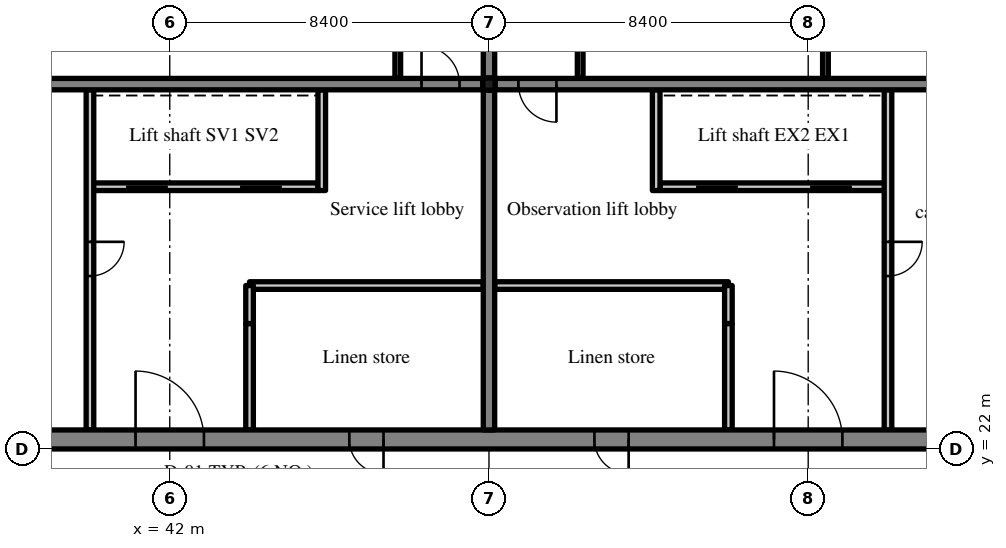
"""IFC4 building model, lengths in metres.
Left out: names, types, materials, properties, quantities, classifications, styles, units other than length and angle.
Written with IfcOpenShell. Run it as: python <this file> out.ifc"""

import sys

from ifc_helpers import new_model, si_unit, direction, frame, frame_2d, origin, origin_2d, place, context, subcontext, project, spatial, rectangle, hollow_circle, extrude, source, transform, mapped, element, fill, save


model = new_model("IFC4")
c1 = context("Model", 3, precision=1e-05, world=origin(), true_north=direction((0.0, 1.0)))
c2 = subcontext(c1, "Body", "Model", "MODEL_VIEW")
j1 = project(units=[si_unit("LENGTHUNIT", "METRE"), si_unit("PLANEANGLEUNIT", "RADIAN")], contexts=[c1])
p1 = place(None, origin())
s1 = spatial("IfcSite", under=j1, at=p1, CompositionType="ELEMENT")
p2 = place(p1, origin())
s2 = spatial("IfcBuilding", under=s1, at=p2, CompositionType="ELEMENT")
p3 = place(p2, frame((0.0, 0.0, 329.7)))
s3 = spatial("IfcBuildingStorey", under=s2, at=p3, CompositionType="ELEMENT", Elevation=329.7)
m1 = source(origin(), c2, "Body", "SweptSolid", [
    extrude(rectangle(XDim=50.4, YDim=0.5, at=frame_2d((25.2, 0.0))), origin(), (0.0, 0.0, 1.0), 4.72),
])
p4 = place(p3, frame((25.2, 22.25, 0.0), z_axis=(0.0, 0.0, 1.0), x_axis=(1.0, 0.0, 0.0)))
e1 = element("IfcWall", 1, at=p4, inside=s3, PredefinedType="SHEAR", context=c2, shape_type="MappedRepresentation", body=[
    mapped(m1, transform((0.0, 0.0, 0.0), scale=1.0)),
])
m2 = source(origin(), c2, "Body", "SweptSolid", [
    extrude(rectangle(XDim=1.8, YDim=2.1, at=frame_2d((0.9, 1.05))), frame((0.0, 0.26, 0.0), z_axis=(0.0, -1.0, 0.0), x_axis=(1.0, 0.0, 0.0)), (0.0, 0.0, 1.0), 0.52),
])
p5 = place(p4, frame((15.9, 0.0, 0.0)))
e2 = element("IfcOpeningElement", 2, at=p5, cuts=e1, PredefinedType="OPENING", context=c2, shape_type="MappedRepresentation", body=[
    mapped(m2, transform((0.0, 0.0, 0.0), scale=1.0)),
])
m3 = source(origin(), c2, "Body", "SweptSolid", [
    extrude(rectangle(XDim=0.9, YDim=2.1, at=frame_2d((0.45, 1.05))), frame((0.0, 0.26, 0.0), z_axis=(0.0, -1.0, 0.0), x_axis=(1.0, 0.0, 0.0)), (0.0, 0.0, 1.0), 0.52),
])
p6 = place(p4, frame((21.525, 0.0, 0.0)))
e3 = element("IfcOpeningElement", 3, at=p6, cuts=e1, PredefinedType="OPENING", context=c2, shape_type="MappedRepresentation", body=[
    mapped(m3, transform((0.0, 0.0, 0.0), scale=1.0)),
])
p7 = place(p4, frame((32.7, 0.0, 0.0)))
e4 = element("IfcOpeningElement", 4, at=p7, cuts=e1, PredefinedType="OPENING", context=c2, shape_type="MappedRepresentation", body=[
    mapped(m2, transform((0.0, 0.0, 0.0), scale=1.0)),
])
p8 = place(p4, frame((39.825, 0.0, 0.0)))
e5 = element("IfcOpeningElement", 5, at=p8, cuts=e1, PredefinedType="OPENING", context=c2, shape_type="MappedRepresentation", body=[
    mapped(m3, transform((0.0, 0.0, 0.0), scale=1.0)),
])
p9 = place(p4, frame((27.975, 0.0, 0.0)))
e6 = element("IfcOpeningElement", 6, at=p9, cuts=e1, PredefinedType="OPENING", context=c2, shape_type="MappedRepresentation", body=[
    mapped(m3, transform((0.0, 0.0, 0.0), scale=1.0)),
])
m4 = source(origin(), c2, "Body", "SweptSolid", [
    extrude(rectangle(XDim=1.2, YDim=2.1, at=frame_2d((0.6, 1.05))), frame((0.0, 0.26, 0.0), z_axis=(0.0, -1.0, 0.0), x_axis=(1.0, 0.0, 0.0)), (0.0, 0.0, 1.0), 0.52),
])
p10 = place(p4, frame((6.5, 0.0, 0.0)))
e7 = element("IfcOpeningElement", 7, at=p10, cuts=e1, PredefinedType="OPENING", context=c2, shape_type="MappedRepresentation", body=[
    mapped(m4, transform((0.0, 0.0, 0.0), scale=1.0)),
])
p11 = place(p4, frame((47.975, 0.0, 0.0)))
e8 = element("IfcOpeningElement", 8, at=p11, cuts=e1, PredefinedType="OPENING", context=c2, shape_type="MappedRepresentation", body=[
    mapped(m4, transform((0.0, 0.0, 0.0), scale=1.0)),
])
m5 = source(origin(), c2, "Body", "SweptSolid", [
    extrude(rectangle(XDim=19.0, YDim=0.3, at=frame_2d((9.5, 0.0))), origin(), (0.0, 0.0, 1.0), 4.72),
])
p12 = place(p3, frame((50.4, 22.5, 0.0), z_axis=(0.0, 0.0, 1.0), x_axis=(0.0, 1.0, 0.0)))
e9 = element("IfcWall", 9, at=p12, inside=s3, PredefinedType="SHEAR", context=c2, shape_type="MappedRepresentation", body=[
    mapped(m5, transform((0.0, 0.0, 0.0), scale=1.0)),
])
m6 = source(origin(), c2, "Body", "SweptSolid", [
    extrude(rectangle(XDim=1.1, YDim=2.1, at=frame_2d((0.55, 1.05))), frame((0.0, 0.16, 0.0), z_axis=(0.0, -1.0, 0.0), x_axis=(1.0, 0.0, 0.0)), (0.0, 0.0, 1.0), 0.32),
])
p13 = place(p12, frame((12.95, 0.0, 0.0)))
e10 = element("IfcOpeningElement", 10, at=p13, cuts=e9, PredefinedType="OPENING", context=c2, shape_type="MappedRepresentation", body=[
    mapped(m6, transform((0.0, 0.0, 0.0), scale=1.0)),
])
m7 = source(origin(), c2, "Body", "SweptSolid", [
    extrude(rectangle(XDim=16.5, YDim=0.3, at=frame_2d((8.25, 0.0))), origin(), (0.0, 0.0, 1.0), 4.72),
])
p14 = place(p3, frame((33.75, 31.6, 0.0), z_axis=(0.0, 0.0, 1.0), x_axis=(1.0, 0.0, 0.0)))
e11 = element("IfcWall", 11, at=p14, inside=s3, PredefinedType="SHEAR", context=c2, shape_type="MappedRepresentation", body=[
    mapped(m7, transform((0.0, 0.0, 0.0), scale=1.0)),
])
m8 = source(origin(), c2, "Body", "SweptSolid", [
    extrude(rectangle(XDim=1.0, YDim=2.1, at=frame_2d((0.5, 1.05))), frame((0.0, 0.16, 0.0), z_axis=(0.0, -1.0, 0.0), x_axis=(1.0, 0.0, 0.0)), (0.0, 0.0, 1.0), 0.32),
])
p15 = place(p14, frame((14.875, 0.0, 0.0)))
e12 = element("IfcOpeningElement", 12, at=p15, cuts=e11, PredefinedType="OPENING", context=c2, shape_type="MappedRepresentation", body=[
    mapped(m8, transform((0.0, 0.0, 0.0), scale=1.0)),
])
p16 = place(p3, frame((50.55, 31.6, 0.0), z_axis=(0.0, 0.0, 1.0), x_axis=(1.0, 0.0, 0.0)))
e13 = element("IfcWall", 13, at=p16, inside=s3, PredefinedType="SHEAR", context=c2, shape_type="MappedRepresentation", body=[
    mapped(m7, transform((0.0, 0.0, 0.0), scale=1.0)),
])
p17 = place(p16, frame((0.625, 0.0, 0.0)))
e14 = element("IfcOpeningElement", 14, at=p17, cuts=e13, PredefinedType="OPENING", context=c2, shape_type="MappedRepresentation", body=[
    mapped(m8, transform((0.0, 0.0, 0.0), scale=1.0)),
])
m9 = source(origin(), c2, "Body", "SweptSolid", [
    extrude(hollow_circle(Radius=0.162, WallThickness=0.012, at=origin_2d()), origin(), (0.0, 0.0, 1.0), 4.4),
])
p18 = place(p3, frame((50.4, 31.6, 5.0), z_axis=(0.0, 0.0, 1.0), x_axis=(1.0, 0.0, 0.0)))
e15 = element("IfcColumn", 15, at=p18, inside=s3, PredefinedType="COLUMN", context=c2, shape_type="MappedRepresentation", body=[
    mapped(m9, transform((0.0, 0.0, 0.0), scale=1.0)),
])
m10 = source(origin(), c2, "Body", "SweptSolid", [
    extrude(rectangle(XDim=6.0, YDim=0.2, at=frame_2d((3.0, 0.0))), origin(), (0.0, 0.0, 1.0), 4.72),
])
p19 = place(p3, frame((39.9, 28.9, 0.0), z_axis=(0.0, 0.0, 1.0), x_axis=(1.0, 0.0, 0.0)))
e16 = element("IfcWall", 16, at=p19, inside=s3, PredefinedType="SOLIDWALL", context=c2, shape_type="MappedRepresentation", body=[
    mapped(m10, transform((0.0, 0.0, 0.0), scale=1.0)),
])
m11 = source(origin(), c2, "Body", "SweptSolid", [
    extrude(rectangle(XDim=1.1, YDim=2.1, at=frame_2d((0.55, 1.05))), frame((0.0, 0.11, 0.0), z_axis=(0.0, -1.0, 0.0), x_axis=(1.0, 0.0, 0.0)), (0.0, 0.0, 1.0), 0.22),
])
p20 = place(p19, frame((0.95, 0.0, 0.0)))
e17 = element("IfcOpeningElement", 17, at=p20, cuts=e16, PredefinedType="OPENING", context=c2, shape_type="MappedRepresentation", body=[
    mapped(m11, transform((0.0, 0.0, 0.0), scale=1.0)),
])
p21 = place(p19, frame((3.95, 0.0, 0.0)))
e18 = element("IfcOpeningElement", 18, at=p21, cuts=e16, PredefinedType="OPENING", context=c2, shape_type="MappedRepresentation", body=[
    mapped(m11, transform((0.0, 0.0, 0.0), scale=1.0)),
])
m12 = source(origin(), c2, "Body", "SweptSolid", [
    extrude(rectangle(XDim=8.95, YDim=0.2, at=frame_2d((4.475, 0.0))), origin(), (0.0, 0.0, 1.0), 4.72),
])
p22 = place(p3, frame((39.9, 22.5, 0.0), z_axis=(0.0, 0.0, 1.0), x_axis=(0.0, 1.0, 0.0)))
e19 = element("IfcWall", 19, at=p22, inside=s3, PredefinedType="PARTITIONING", context=c2, shape_type="MappedRepresentation", body=[
    mapped(m12, transform((0.0, 0.0, 0.0), scale=1.0)),
])
m13 = source(origin(), c2, "Body", "SweptSolid", [
    extrude(rectangle(XDim=0.9, YDim=2.1, at=frame_2d((0.45, 1.05))), frame((0.0, 0.11, 0.0), z_axis=(0.0, -1.0, 0.0), x_axis=(1.0, 0.0, 0.0)), (0.0, 0.0, 1.0), 0.22),
])
p23 = place(p22, frame((4.05, 0.0, 0.0)))
e20 = element("IfcOpeningElement", 20, at=p23, cuts=e19, PredefinedType="OPENING", context=c2, shape_type="MappedRepresentation", body=[
    mapped(m13, transform((0.0, 0.0, 0.0), scale=1.0)),
])
m14 = source(origin(), c2, "Body", "SweptSolid", [
    extrude(rectangle(XDim=2.8, YDim=0.2, at=frame_2d((1.4, 0.0))), origin(), (0.0, 0.0, 1.0), 4.72),
])
p24 = place(p3, frame((44.1, 22.5, 0.0), z_axis=(0.0, 0.0, 1.0), x_axis=(0.0, 1.0, 0.0)))
e21 = element("IfcWall", 21, at=p24, inside=s3, PredefinedType="PARTITIONING", context=c2, shape_type="MappedRepresentation", body=[
    mapped(m14, transform((0.0, 0.0, 0.0), scale=1.0)),
])
m15 = source(origin(), c2, "Body", "SweptSolid", [
    extrude(rectangle(XDim=2.65, YDim=0.2, at=frame_2d((1.325, 0.0))), origin(), (0.0, 0.0, 1.0), 4.72),
])
p25 = place(p3, frame((46.0, 28.8, 0.0), z_axis=(0.0, 0.0, 1.0), x_axis=(0.0, 1.0, 0.0)))
e22 = element("IfcWall", 22, at=p25, inside=s3, PredefinedType="SOLIDWALL", context=c2, shape_type="MappedRepresentation", body=[
    mapped(m15, transform((0.0, 0.0, 0.0), scale=1.0)),
])
m16 = source(origin(), c2, "Body", "SweptSolid", [
    extrude(rectangle(XDim=6.15, YDim=0.2, at=frame_2d((3.075, 0.0))), origin(), (0.0, 0.0, 1.0), 4.72),
])
p26 = place(p3, frame((44.1, 26.3, 0.0), z_axis=(0.0, 0.0, 1.0), x_axis=(1.0, 0.0, 0.0)))
e23 = element("IfcWall", 23, at=p26, inside=s3, PredefinedType="PARTITIONING", context=c2, shape_type="MappedRepresentation", body=[
    mapped(m16, transform((0.0, 0.0, 0.0), scale=1.0)),
])
m17 = source(origin(), c2, "Body", "SweptSolid", [
    extrude(rectangle(XDim=1.0, YDim=0.2, at=frame_2d((0.5, 0.0))), origin(), (0.0, 0.0, 1.0), 4.72),
])
p27 = place(p3, frame((44.1, 25.3, 0.0), z_axis=(0.0, 0.0, 1.0), x_axis=(0.0, 1.0, 0.0)))
e24 = element("IfcWall", 24, at=p27, inside=s3, PredefinedType="PARTITIONING", context=c2, shape_type="MappedRepresentation", body=[
    mapped(m17, transform((0.0, 0.0, 0.0), scale=1.0)),
])
m18 = source(origin(), c2, "Body", "SweptSolid", [
    extrude(rectangle(XDim=3.25, YDim=0.15, at=frame_2d((1.625, 0.0))), origin(), (0.0, 0.0, 1.0), 4.72),
])
p28 = place(p3, frame((48.0, 31.75, 0.0), z_axis=(0.0, 0.0, 1.0), x_axis=(0.0, 1.0, 0.0)))
e25 = element("IfcWall", 25, at=p28, inside=s3, PredefinedType="PARTITIONING", context=c2, shape_type="MappedRepresentation", body=[
    mapped(m18, transform((0.0, 0.0, 0.0), scale=1.0)),
])
p29 = place(p3, frame((60.9, 28.9, 0.0), z_axis=(0.0, 0.0, 1.0), x_axis=(-1.0, 0.0, 0.0)))
e26 = element("IfcWall", 26, at=p29, inside=s3, PredefinedType="SOLIDWALL", context=c2, shape_type="MappedRepresentation", body=[
    mapped(m10, transform((0.0, 0.0, 0.0), scale=1.0)),
])
p30 = place(p29, frame((0.95, 0.0, 0.0)))
e27 = element("IfcOpeningElement", 27, at=p30, cuts=e26, PredefinedType="OPENING", context=c2, shape_type="MappedRepresentation", body=[
    mapped(m11, transform((0.0, 0.0, 0.0), scale=1.0)),
])
p31 = place(p29, frame((3.95, 0.0, 0.0)))
e28 = element("IfcOpeningElement", 28, at=p31, cuts=e26, PredefinedType="OPENING", context=c2, shape_type="MappedRepresentation", body=[
    mapped(m11, transform((0.0, 0.0, 0.0), scale=1.0)),
])
p32 = place(p3, frame((60.9, 22.5, 0.0), z_axis=(0.0, 0.0, 1.0), x_axis=(0.0, 1.0, 0.0)))
e29 = element("IfcWall", 29, at=p32, inside=s3, PredefinedType="PARTITIONING", context=c2, shape_type="MappedRepresentation", body=[
    mapped(m12, transform((0.0, 0.0, 0.0), scale=1.0)),
])
p33 = place(p32, frame((4.05, 0.0, 0.0)))
e30 = element("IfcOpeningElement", 30, at=p33, cuts=e29, PredefinedType="OPENING", context=c2, shape_type="MappedRepresentation", body=[
    mapped(m13, transform((0.0, 0.0, 0.0), scale=1.0)),
])
p34 = place(p3, frame((56.7, 22.5, 0.0), z_axis=(0.0, 0.0, 1.0), x_axis=(0.0, 1.0, 0.0)))
e31 = element("IfcWall", 31, at=p34, inside=s3, PredefinedType="PARTITIONING", context=c2, shape_type="MappedRepresentation", body=[
    mapped(m14, transform((0.0, 0.0, 0.0), scale=1.0)),
])
p35 = place(p3, frame((54.8, 28.8, 0.0), z_axis=(0.0, 0.0, 1.0), x_axis=(0.0, 1.0, 0.0)))
e32 = element("IfcWall", 32, at=p35, inside=s3, PredefinedType="SOLIDWALL", context=c2, shape_type="MappedRepresentation", body=[
    mapped(m15, transform((0.0, 0.0, 0.0), scale=1.0)),
])
p36 = place(p3, frame((56.7, 26.3, 0.0), z_axis=(0.0, 0.0, 1.0), x_axis=(-1.0, 0.0, 0.0)))
e33 = element("IfcWall", 33, at=p36, inside=s3, PredefinedType="PARTITIONING", context=c2, shape_type="MappedRepresentation", body=[
    mapped(m16, transform((0.0, 0.0, 0.0), scale=1.0)),
])
p37 = place(p3, frame((56.7, 25.3, 0.0), z_axis=(0.0, 0.0, 1.0), x_axis=(0.0, 1.0, 0.0)))
e34 = element("IfcWall", 34, at=p37, inside=s3, PredefinedType="PARTITIONING", context=c2, shape_type="MappedRepresentation", body=[
    mapped(m17, transform((0.0, 0.0, 0.0), scale=1.0)),
])
for number, where, z_axis, x_axis in (
    (35, (52.8, 31.75, 0.0), (0.0, 0.0, 1.0), (0.0, 1.0, 0.0)),
    (36, (59.254, 31.75, 0.0), (0.0, 0.0, 1.0), (0.0, 1.0, 0.0)),
):
    element("IfcWall", number, at=place(p3, frame(where, z_axis=z_axis, x_axis=x_axis)), inside=s3, PredefinedType="PARTITIONING", context=c2, shape_type="MappedRepresentation", body=[
        mapped(m18, transform((0.0, 0.0, 0.0), scale=1.0)),
    ])
m19 = source(origin(), c2, "Body", "SweptSolid", [
    extrude(rectangle(XDim=1.8, YDim=2.1, at=frame_2d((0.9, 1.05))), frame((0.0, 0.175, 0.0), z_axis=(0.0, -1.0, 0.0), x_axis=(1.0, 0.0, 0.0)), (0.0, 0.0, 1.0), 0.05),
])
p38 = place(p5, origin())
e37 = element("IfcDoor", 37, at=p38, inside=s3, OperationType="DOUBLE_DOOR_SINGLE_SWING", PredefinedType="DOOR", context=c2, shape_type="MappedRepresentation", body=[
    mapped(m19, transform((0.0, 0.0, 0.0), scale=1.0)),
])
fill(e2, e37)
m20 = source(origin(), c2, "Body", "SweptSolid", [
    extrude(rectangle(XDim=1.0, YDim=2.1, at=frame_2d((0.5, 1.05))), frame((0.0, 0.025, 0.0), z_axis=(0.0, -1.0, 0.0), x_axis=(1.0, 0.0, 0.0)), (0.0, 0.0, 1.0), 0.05),
])
p39 = place(p15, origin())
e38 = element("IfcDoor", 38, at=p39, inside=s3, OperationType="SINGLE_SWING_LEFT", PredefinedType="DOOR", context=c2, shape_type="MappedRepresentation", body=[
    mapped(m20, transform((0.0, 0.0, 0.0), scale=1.0)),
])
fill(e12, e38)
m21 = source(origin(), c2, "Body", "SweptSolid", [
    extrude(rectangle(XDim=1.1, YDim=2.1, at=frame_2d((0.55, 1.05))), frame((0.0, 0.025, 0.0), z_axis=(0.0, -1.0, 0.0), x_axis=(1.0, 0.0, 0.0)), (0.0, 0.0, 1.0), 0.05),
])
p40 = place(p20, origin())
e39 = element("IfcDoor", 39, at=p40, inside=s3, OperationType="SLIDING_TO_LEFT", PredefinedType="DOOR", context=c2, shape_type="MappedRepresentation", body=[
    mapped(m21, transform((0.0, 0.0, 0.0), scale=1.0)),
])
fill(e17, e39)
p41 = place(p21, origin())
e40 = element("IfcDoor", 40, at=p41, inside=s3, OperationType="SLIDING_TO_RIGHT", PredefinedType="DOOR", context=c2, shape_type="MappedRepresentation", body=[
    mapped(m21, transform((0.0, 0.0, 0.0), scale=1.0)),
])
fill(e18, e40)
m22 = source(origin(), c2, "Body", "SweptSolid", [
    extrude(rectangle(XDim=0.9, YDim=2.1, at=frame_2d((0.45, 1.05))), frame((0.0, 0.025, 0.0), z_axis=(0.0, -1.0, 0.0), x_axis=(1.0, 0.0, 0.0)), (0.0, 0.0, 1.0), 0.05),
])
p42 = place(p23, origin())
e41 = element("IfcDoor", 41, at=p42, inside=s3, OperationType="SINGLE_SWING_RIGHT", PredefinedType="DOOR", context=c2, shape_type="MappedRepresentation", body=[
    mapped(m22, transform((0.0, 0.0, 0.0), scale=1.0)),
])
fill(e20, e41)
m23 = source(origin(), c2, "Body", "SweptSolid", [
    extrude(rectangle(XDim=0.9, YDim=2.1, at=frame_2d((0.45, 1.05))), frame((0.0, 0.175, 0.0), z_axis=(0.0, -1.0, 0.0), x_axis=(1.0, 0.0, 0.0)), (0.0, 0.0, 1.0), 0.05),
])
p43 = place(p6, origin())
e42 = element("IfcDoor", 42, at=p43, inside=s3, OperationType="SINGLE_SWING_RIGHT", PredefinedType="DOOR", context=c2, shape_type="MappedRepresentation", body=[
    mapped(m23, transform((0.0, 0.0, 0.0), scale=1.0)),
])
fill(e3, e42)
p44 = place(p7, origin())
e43 = element("IfcDoor", 43, at=p44, inside=s3, OperationType="DOUBLE_DOOR_SINGLE_SWING", PredefinedType="DOOR", context=c2, shape_type="MappedRepresentation", body=[
    mapped(m19, transform((0.0, 0.0, 0.0), scale=1.0)),
])
fill(e4, e43)
p45 = place(p17, origin())
e44 = element("IfcDoor", 44, at=p45, inside=s3, OperationType="SINGLE_SWING_RIGHT", PredefinedType="DOOR", context=c2, shape_type="MappedRepresentation", body=[
    mapped(m20, transform((0.0, 0.0, 0.0), scale=1.0)),
])
fill(e14, e44)
p46 = place(p30, origin())
e45 = element("IfcDoor", 45, at=p46, inside=s3, OperationType="SLIDING_TO_RIGHT", PredefinedType="DOOR", context=c2, shape_type="MappedRepresentation", body=[
    mapped(m21, transform((0.0, 0.0, 0.0), scale=1.0)),
])
fill(e27, e45)
p47 = place(p31, origin())
e46 = element("IfcDoor", 46, at=p47, inside=s3, OperationType="SLIDING_TO_LEFT", PredefinedType="DOOR", context=c2, shape_type="MappedRepresentation", body=[
    mapped(m21, transform((0.0, 0.0, 0.0), scale=1.0)),
])
fill(e28, e46)
p48 = place(p33, origin())
e47 = element("IfcDoor", 47, at=p48, inside=s3, OperationType="SINGLE_SWING_RIGHT", PredefinedType="DOOR", context=c2, shape_type="MappedRepresentation", body=[
    mapped(m22, transform((0.0, 0.0, 0.0), scale=1.0)),
])
fill(e30, e47)
p49 = place(p9, origin())
e48 = element("IfcDoor", 48, at=p49, inside=s3, OperationType="SINGLE_SWING_RIGHT", PredefinedType="DOOR", context=c2, shape_type="MappedRepresentation", body=[
    mapped(m23, transform((0.0, 0.0, 0.0), scale=1.0)),
])
fill(e6, e48)
save(model, sys.argv[1])
